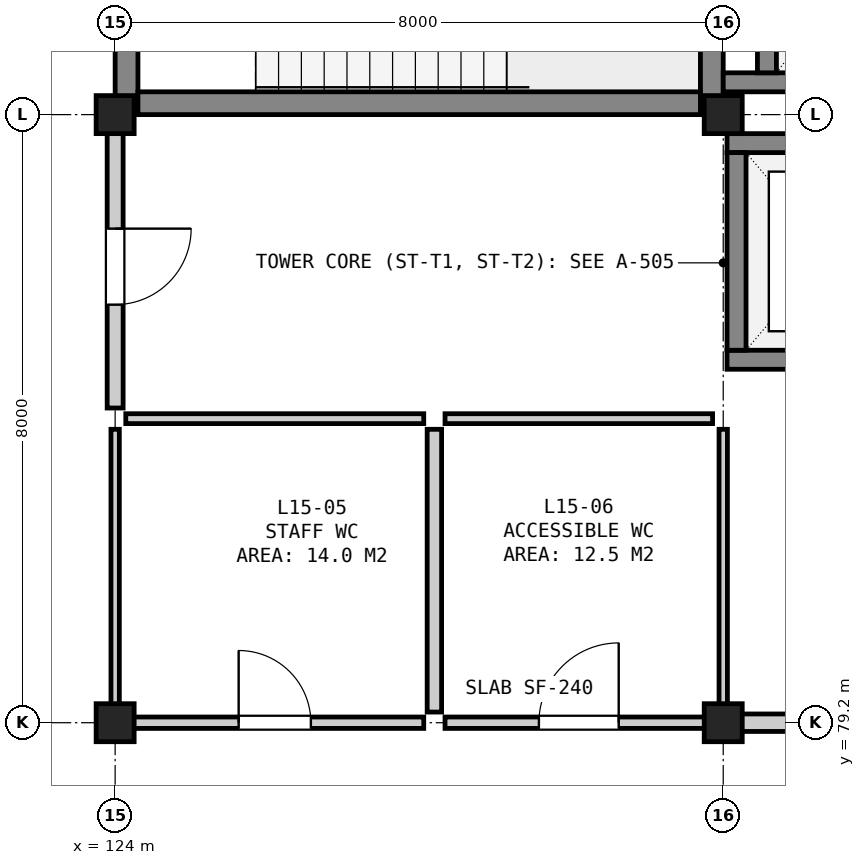
"""IFC4 building model, lengths in metres.
Left out: names, types, materials, properties, quantities, classifications, styles, units other than length and angle.
Written with IfcOpenShell. Run it as: python <this file> out.ifc"""

import sys

from ifc_helpers import new_model, si_unit, direction, frame, frame_2d, origin, origin_2d, place, context, subcontext, project, spatial, rectangle, extrude, element, fill, save


model = new_model("IFC4")
c1 = context("Model", 3, precision=1e-05, world=origin(), true_north=direction((0.0, 1.0)))
c2 = subcontext(c1, "Body", "Model", "MODEL_VIEW")
j1 = project(units=[si_unit("LENGTHUNIT", "METRE"), si_unit("PLANEANGLEUNIT", "RADIAN")], contexts=[c1])
p1 = place(None, origin())
s1 = spatial("IfcSite", under=j1, at=p1, CompositionType="ELEMENT")
p2 = place(p1, origin())
s2 = spatial("IfcBuilding", under=s1, at=p2, CompositionType="ELEMENT")
p3 = place(p2, frame((0.0, 0.0, 62.65)))
s3 = spatial("IfcBuildingStorey", under=s2, at=p3, CompositionType="ELEMENT", Elevation=62.65)
for number, where, z_axis, x_axis in (
    (1, (124.0, 79.2, 0.0), (0.0, 0.0, 1.0), (1.0, 0.0, 0.0)),
    (2, (124.0, 87.2, 0.0), (0.0, 0.0, 1.0), (1.0, 0.0, 0.0)),
    (3, (132.0, 79.2, 0.0), (0.0, 0.0, 1.0), (1.0, 0.0, 0.0)),
    (4, (132.0, 87.2, 0.0), (0.0, 0.0, 1.0), (1.0, 0.0, 0.0)),
):
    element("IfcColumn", number, at=place(p3, frame(where, z_axis=z_axis, x_axis=x_axis)), inside=s3, PredefinedType="COLUMN", context=c2, shape_type="SweptSolid", body=[
        extrude(rectangle(XDim=0.5, YDim=0.5, at=origin_2d()), origin(), (0.0, 0.0, 1.0), 3.95),
    ])
for number, where, z_axis, x_axis in (
    (5, (124.15, 87.2, 0.0), (0.0, 0.0, 1.0), (0.0, 1.0, 0.0)),
    (6, (131.85, 87.2, 0.0), (0.0, 0.0, 1.0), (0.0, 1.0, 0.0)),
):
    element("IfcWall", number, at=place(p3, frame(where, z_axis=z_axis, x_axis=x_axis)), inside=s3, PredefinedType="SHEAR", context=c2, shape_type="SweptSolid", body=[
        extrude(rectangle(XDim=4.2, YDim=0.3, at=frame_2d((2.1, 0.0))), origin(), (0.0, 0.0, 1.0), 3.67),
    ])
p4 = place(p3, frame((124.3, 87.35, 0.0), z_axis=(0.0, 0.0, 1.0), x_axis=(1.0, 0.0, 0.0)))
e7 = element("IfcWall", 7, at=p4, inside=s3, PredefinedType="SHEAR", context=c2, shape_type="SweptSolid", body=[
    extrude(rectangle(XDim=7.4, YDim=0.3, at=frame_2d((3.7, 0.0))), origin(), (0.0, 0.0, 1.0), 3.67),
])
p5 = place(p3, frame((132.0, 87.625, 0.0), z_axis=(0.0, 0.0, 1.0), x_axis=(1.0, 0.0, 0.0)))
e8 = element("IfcWall", 8, at=p5, inside=s3, PredefinedType="SHEAR", context=c2, shape_type="SweptSolid", body=[
    extrude(rectangle(XDim=3.15, YDim=0.25, at=frame_2d((1.575, 0.0))), origin(), (0.0, 0.0, 1.0), 3.67),
])
p6 = place(p3, frame((132.575, 87.75, 0.0), z_axis=(0.0, 0.0, 1.0), x_axis=(0.0, 1.0, 0.0)))
e9 = element("IfcWall", 9, at=p6, inside=s3, PredefinedType="SHEAR", context=c2, shape_type="SweptSolid", body=[
    extrude(rectangle(XDim=2.9, YDim=0.25, at=frame_2d((1.45, 0.0))), origin(), (0.0, 0.0, 1.0), 3.67),
])
p7 = place(p3, frame((132.05, 83.975, 0.0), z_axis=(0.0, 0.0, 1.0), x_axis=(1.0, 0.0, 0.0)))
e10 = element("IfcWall", 10, at=p7, inside=s3, PredefinedType="SHEAR", context=c2, shape_type="SweptSolid", body=[
    extrude(rectangle(XDim=2.7, YDim=0.25, at=frame_2d((1.35, 0.0))), origin(), (0.0, 0.0, 1.0), 3.67),
])
p8 = place(p7, frame((0.8, 0.0, 0.0)))
e11 = element("IfcOpeningElement", 11, at=p8, cuts=e10, PredefinedType="OPENING", context=c2, shape_type="SweptSolid", body=[
    extrude(rectangle(XDim=1.1, YDim=2.15, at=frame_2d((0.55, 1.075))), frame((0.0, 0.137, 0.0), z_axis=(0.0, -1.0, 0.0), x_axis=(1.0, 0.0, 0.0)), (0.0, 0.0, 1.0), 0.274),
])
p9 = place(p3, frame((132.05, 86.825, 0.0), z_axis=(0.0, 0.0, 1.0), x_axis=(1.0, 0.0, 0.0)))
e12 = element("IfcWall", 12, at=p9, inside=s3, PredefinedType="SHEAR", context=c2, shape_type="SweptSolid", body=[
    extrude(rectangle(XDim=2.7, YDim=0.25, at=frame_2d((1.35, 0.0))), origin(), (0.0, 0.0, 1.0), 3.67),
])
p10 = place(p3, frame((132.175, 84.1, 0.0), z_axis=(0.0, 0.0, 1.0), x_axis=(0.0, 1.0, 0.0)))
e13 = element("IfcWall", 13, at=p10, inside=s3, PredefinedType="SHEAR", context=c2, shape_type="SweptSolid", body=[
    extrude(rectangle(XDim=2.6, YDim=0.25, at=frame_2d((1.3, 0.0))), origin(), (0.0, 0.0, 1.0), 3.67),
])
p11 = place(p3, frame((124.14, 79.2, 0.0), z_axis=(0.0, 0.0, 1.0), x_axis=(1.0, 0.0, 0.0)))
e14 = element("IfcWall", 14, at=p11, inside=s3, PredefinedType="PARTITIONING", context=c2, shape_type="SweptSolid", body=[
    extrude(rectangle(XDim=3.92, YDim=0.15, at=frame_2d((1.96, 0.0))), origin(), (0.0, 0.0, 1.0), 2.995),
])
p12 = place(p11, frame((1.485, 0.0, 0.0)))
e15 = element("IfcOpeningElement", 15, at=p12, cuts=e14, PredefinedType="OPENING", context=c2, shape_type="SweptSolid", body=[
    extrude(rectangle(XDim=0.95, YDim=2.15, at=frame_2d((0.475, 1.075))), frame((0.0, 0.087, 0.0), z_axis=(0.0, -1.0, 0.0), x_axis=(1.0, 0.0, 0.0)), (0.0, 0.0, 1.0), 0.174),
])
p13 = place(p3, frame((124.14, 83.2, 0.0), z_axis=(0.0, 0.0, 1.0), x_axis=(1.0, 0.0, 0.0)))
e16 = element("IfcWall", 16, at=p13, inside=s3, PredefinedType="PARTITIONING", context=c2, shape_type="SweptSolid", body=[
    extrude(rectangle(XDim=3.92, YDim=0.13, at=frame_2d((1.96, 0.0))), origin(), (0.0, 0.0, 1.0), 3.67),
])
p14 = place(p3, frame((124.0, 79.34, 0.0), z_axis=(0.0, 0.0, 1.0), x_axis=(0.0, 1.0, 0.0)))
e17 = element("IfcWall", 17, at=p14, inside=s3, PredefinedType="PARTITIONING", context=c2, shape_type="SweptSolid", body=[
    extrude(rectangle(XDim=3.72, YDim=0.11, at=frame_2d((1.86, 0.0))), origin(), (0.0, 0.0, 1.0), 3.195),
])
p15 = place(p3, frame((128.2, 79.34, 0.0), z_axis=(0.0, 0.0, 1.0), x_axis=(0.0, 1.0, 0.0)))
e18 = element("IfcWall", 18, at=p15, inside=s3, PredefinedType="PARTITIONING", context=c2, shape_type="SweptSolid", body=[
    extrude(rectangle(XDim=3.72, YDim=0.19, at=frame_2d((1.86, 0.0))), origin(), (0.0, 0.0, 1.0), 3.67),
])
p16 = place(p3, frame((128.34, 79.2, 0.0), z_axis=(0.0, 0.0, 1.0), x_axis=(1.0, 0.0, 0.0)))
e19 = element("IfcWall", 19, at=p16, inside=s3, PredefinedType="PARTITIONING", context=c2, shape_type="SweptSolid", body=[
    extrude(rectangle(XDim=3.52, YDim=0.15, at=frame_2d((1.76, 0.0))), origin(), (0.0, 0.0, 1.0), 2.995),
])
p17 = place(p16, frame((1.235, 0.0, 0.0)))
e20 = element("IfcOpeningElement", 20, at=p17, cuts=e19, PredefinedType="OPENING", context=c2, shape_type="SweptSolid", body=[
    extrude(rectangle(XDim=1.05, YDim=2.15, at=frame_2d((0.525, 1.075))), frame((0.0, 0.087, 0.0), z_axis=(0.0, -1.0, 0.0), x_axis=(1.0, 0.0, 0.0)), (0.0, 0.0, 1.0), 0.174),
])
p18 = place(p3, frame((128.34, 83.2, 0.0), z_axis=(0.0, 0.0, 1.0), x_axis=(1.0, 0.0, 0.0)))
e21 = element("IfcWall", 21, at=p18, inside=s3, PredefinedType="PARTITIONING", context=c2, shape_type="SweptSolid", body=[
    extrude(rectangle(XDim=3.52, YDim=0.13, at=frame_2d((1.76, 0.0))), origin(), (0.0, 0.0, 1.0), 3.67),
])
p19 = place(p3, frame((132.0, 79.34, 0.0), z_axis=(0.0, 0.0, 1.0), x_axis=(0.0, 1.0, 0.0)))
e22 = element("IfcWall", 22, at=p19, inside=s3, PredefinedType="PARTITIONING", context=c2, shape_type="SweptSolid", body=[
    extrude(rectangle(XDim=3.72, YDim=0.11, at=frame_2d((1.86, 0.0))), origin(), (0.0, 0.0, 1.0), 2.995),
])
p20 = place(p3, frame((124.0, 83.34, 0.0), z_axis=(0.0, 0.0, 1.0), x_axis=(0.0, 1.0, 0.0)))
e23 = element("IfcWall", 23, at=p20, inside=s3, PredefinedType="SOLIDWALL", context=c2, shape_type="SweptSolid", body=[
    extrude(rectangle(XDim=3.72, YDim=0.21, at=frame_2d((1.86, 0.0))), origin(), (0.0, 0.0, 1.0), 3.195),
])
p21 = place(p20, frame((1.36, 0.0, 0.0)))
e24 = element("IfcOpeningElement", 24, at=p21, cuts=e23, PredefinedType="OPENING", context=c2, shape_type="SweptSolid", body=[
    extrude(rectangle(XDim=1.0, YDim=2.15, at=frame_2d((0.5, 1.075))), frame((0.0, 0.117, 0.0), z_axis=(0.0, -1.0, 0.0), x_axis=(1.0, 0.0, 0.0)), (0.0, 0.0, 1.0), 0.234),
])
p22 = place(p3, frame((132.14, 79.2, 0.0), z_axis=(0.0, 0.0, 1.0), x_axis=(1.0, 0.0, 0.0)))
e25 = element("IfcWall", 25, at=p22, inside=s3, PredefinedType="SOLIDWALL", context=c2, shape_type="SweptSolid", body=[
    extrude(rectangle(XDim=7.72, YDim=0.23, at=frame_2d((3.86, 0.0))), origin(), (0.0, 0.0, 1.0), 3.045),
])
p23 = place(p22, frame((3.11, 0.0, 0.0)))
e26 = element("IfcOpeningElement", 26, at=p23, cuts=e25, PredefinedType="OPENING", context=c2, shape_type="SweptSolid", body=[
    extrude(rectangle(XDim=1.5, YDim=2.2, at=frame_2d((0.75, 1.1))), frame((0.0, 0.127, 0.0), z_axis=(0.0, -1.0, 0.0), x_axis=(1.0, 0.0, 0.0)), (0.0, 0.0, 1.0), 0.254),
])
p24 = place(p12, origin())
e27 = element("IfcDoor", 27, at=p24, inside=s3, OperationType="SINGLE_SWING_LEFT", PredefinedType="DOOR", context=c2, shape_type="SweptSolid", body=[
    extrude(rectangle(XDim=0.95, YDim=2.15, at=frame_2d((0.475, 1.075))), frame((0.0, 0.025, 0.0), z_axis=(0.0, -1.0, 0.0), x_axis=(1.0, 0.0, 0.0)), (0.0, 0.0, 1.0), 0.05),
])
fill(e15, e27)
p25 = place(p17, origin())
e28 = element("IfcDoor", 28, at=p25, inside=s3, OperationType="SINGLE_SWING_RIGHT", PredefinedType="DOOR", context=c2, shape_type="SweptSolid", body=[
    extrude(rectangle(XDim=1.05, YDim=2.15, at=frame_2d((0.525, 1.075))), frame((0.0, 0.025, 0.0), z_axis=(0.0, -1.0, 0.0), x_axis=(1.0, 0.0, 0.0)), (0.0, 0.0, 1.0), 0.05),
])
fill(e20, e28)
p26 = place(p21, frame((1.0, 0.0, 0.0), z_axis=(0.0, 0.0, 1.0), x_axis=(-1.0, 0.0, 0.0)))
e29 = element("IfcDoor", 29, at=p26, inside=s3, OperationType="SINGLE_SWING_LEFT", PredefinedType="DOOR", context=c2, shape_type="SweptSolid", body=[
    extrude(rectangle(XDim=1.0, YDim=2.15, at=frame_2d((0.5, 1.075))), frame((0.0, 0.025, 0.0), z_axis=(0.0, -1.0, 0.0), x_axis=(1.0, 0.0, 0.0)), (0.0, 0.0, 1.0), 0.05),
])
fill(e24, e29)
save(model, sys.argv[1])
